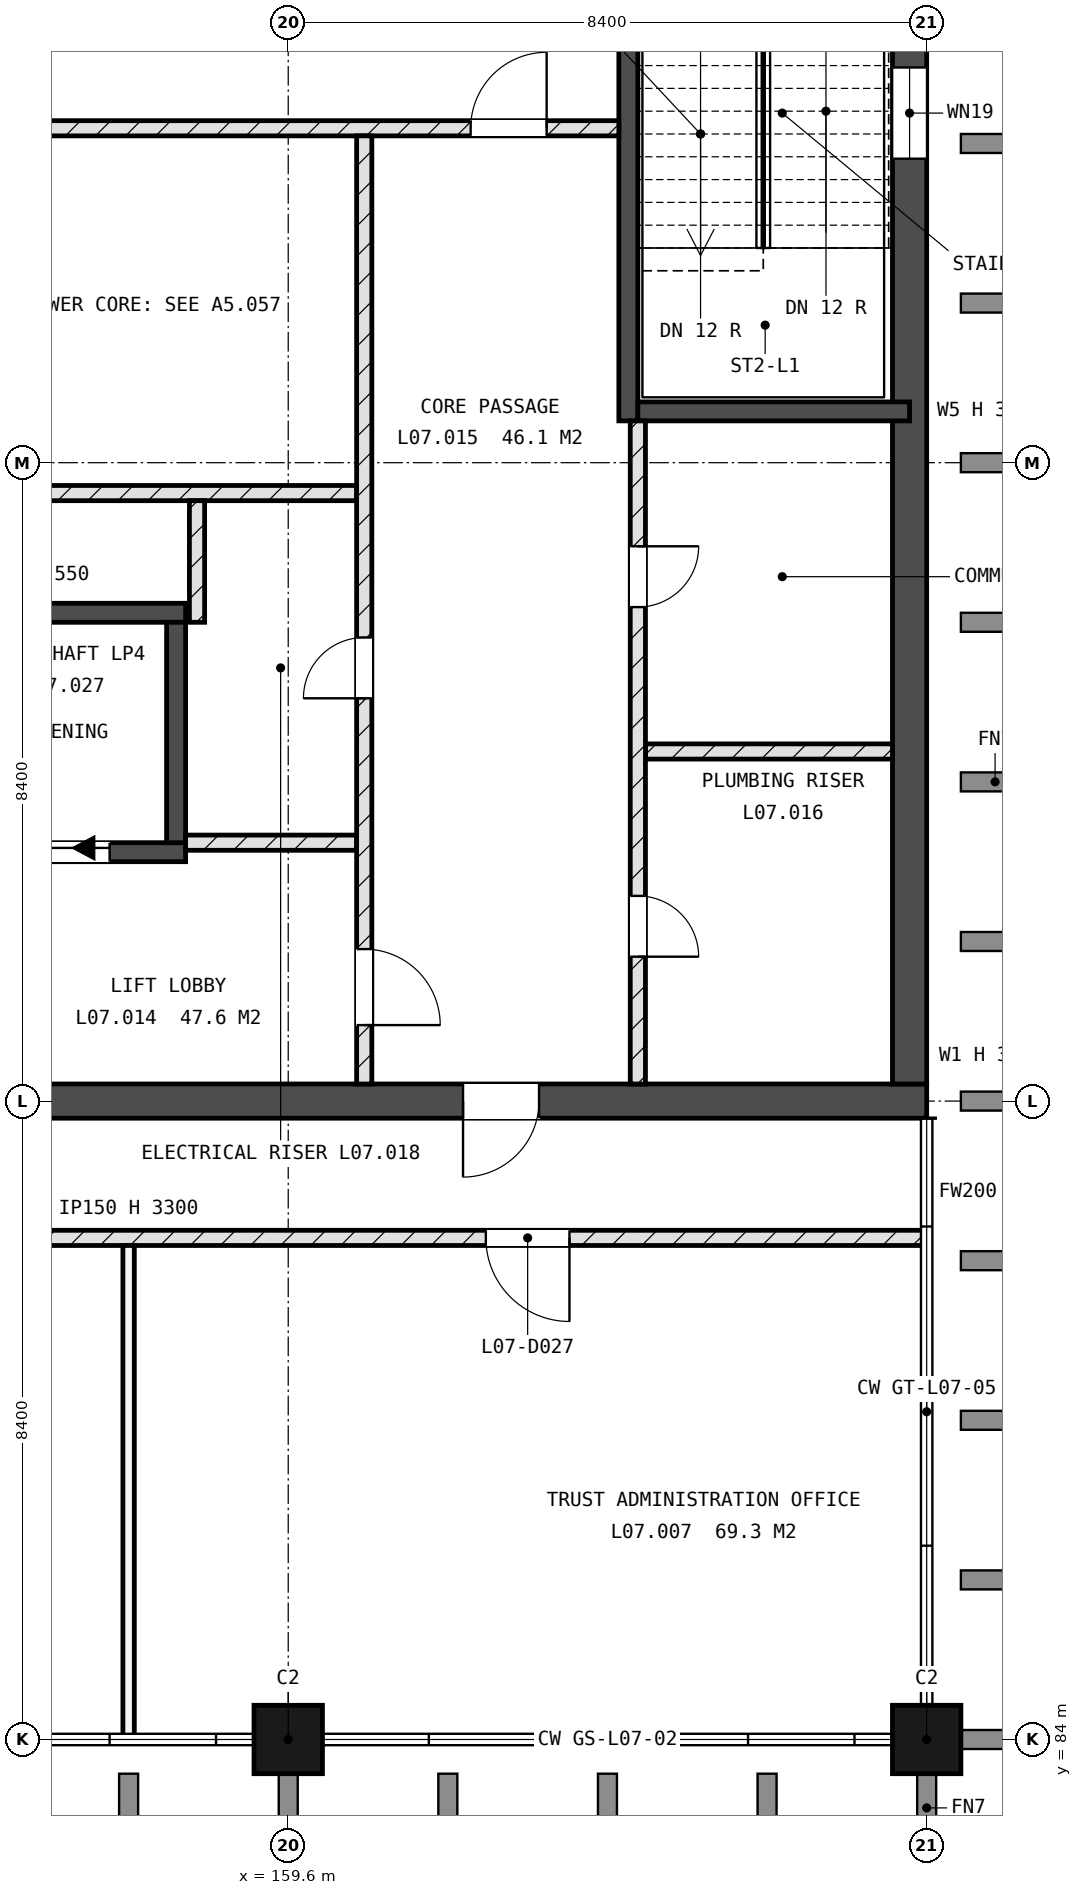
"""IFC4 building model, lengths in metres.
Left out: names, types, materials, properties, quantities, classifications, styles, units other than length and angle.
Written with IfcOpenShell. Run it as: python <this file> out.ifc"""

import sys

from ifc_helpers import new_model, si_unit, direction, frame, frame_2d, origin, origin_2d, place, context, subcontext, project, spatial, rectangle, extrude, element, fill, save


model = new_model("IFC4")
c1 = context("Model", 3, precision=1e-05, world=origin(), true_north=direction((0.0, 1.0)))
c2 = subcontext(c1, "Body", "Model", "MODEL_VIEW")
j1 = project(units=[si_unit("LENGTHUNIT", "METRE"), si_unit("PLANEANGLEUNIT", "RADIAN")], contexts=[c1])
p1 = place(None, origin())
s1 = spatial("IfcSite", under=j1, at=p1, CompositionType="ELEMENT")
p2 = place(p1, origin())
s2 = spatial("IfcBuilding", under=s1, at=p2, CompositionType="ELEMENT")
p3 = place(p2, frame((0.0, 0.0, 28.8)))
s3 = spatial("IfcBuildingStorey", under=s2, at=p3, CompositionType="ELEMENT", Elevation=28.8)
for number, where, z_axis, x_axis in (
    (1, (159.6, 84.0, -0.25), (0.0, 0.0, 1.0), (1.0, 0.0, 0.0)),
    (2, (168.0, 84.0, -0.25), (0.0, 0.0, 1.0), (1.0, 0.0, 0.0)),
):
    element("IfcColumn", number, at=place(p3, frame(where, z_axis=z_axis, x_axis=x_axis)), inside=s3, PredefinedType="COLUMN", context=c2, shape_type="SweptSolid", body=[
        extrude(rectangle(XDim=0.9, YDim=0.9, at=origin_2d()), origin(), (0.0, 0.0, 1.0), 3.6),
    ])
p4 = place(p3, frame((142.8, 92.4, -0.25), z_axis=(0.0, 0.0, 1.0), x_axis=(1.0, 0.0, 0.0)))
e3 = element("IfcWall", 3, at=p4, inside=s3, PredefinedType="SHEAR", context=c2, shape_type="SweptSolid", body=[
    extrude(rectangle(XDim=25.2, YDim=0.45, at=frame_2d((12.6, 0.0))), origin(), (0.0, 0.0, 1.0), 3.6),
])
p5 = place(p4, frame((1.4, 0.0, 0.25)))
e4 = element("IfcOpeningElement", 4, at=p5, cuts=e3, PredefinedType="OPENING", context=c2, shape_type="SweptSolid", body=[
    extrude(rectangle(XDim=1.0, YDim=2.1, at=frame_2d((0.5, 1.05))), frame((0.0, 0.235, 0.0), z_axis=(0.0, -1.0, 0.0), x_axis=(1.0, 0.0, 0.0)), (0.0, 0.0, 1.0), 0.47),
])
p6 = place(p4, frame((19.1, 0.0, 0.25)))
e5 = element("IfcOpeningElement", 5, at=p6, cuts=e3, PredefinedType="OPENING", context=c2, shape_type="SweptSolid", body=[
    extrude(rectangle(XDim=1.0, YDim=2.1, at=frame_2d((0.5, 1.05))), frame((0.0, 0.235, 0.0), z_axis=(0.0, -1.0, 0.0), x_axis=(1.0, 0.0, 0.0)), (0.0, 0.0, 1.0), 0.47),
])
p7 = place(p4, frame((10.4, 0.0, 0.25)))
e6 = element("IfcOpeningElement", 6, at=p7, cuts=e3, PredefinedType="OPENING", context=c2, shape_type="SweptSolid", body=[
    extrude(rectangle(XDim=1.0, YDim=2.1, at=frame_2d((0.5, 1.05))), frame((0.0, 0.235, 0.0), z_axis=(0.0, -1.0, 0.0), x_axis=(1.0, 0.0, 0.0)), (0.0, 0.0, 1.0), 0.47),
])
p8 = place(p3, frame((167.775, 92.625, -0.25), z_axis=(0.0, 0.0, 1.0), x_axis=(0.0, 1.0, 0.0)))
e7 = element("IfcWall", 7, at=p8, inside=s3, PredefinedType="SHEAR", context=c2, shape_type="SweptSolid", body=[
    extrude(rectangle(XDim=16.35, YDim=0.45, at=frame_2d((8.175, 0.0))), origin(), (0.0, 0.0, 1.0), 3.6),
])
p9 = place(p8, frame((12.175, 0.0, 1.85)))
e8 = element("IfcOpeningElement", 8, at=p9, cuts=e7, PredefinedType="OPENING", context=c2, shape_type="SweptSolid", body=[
    extrude(rectangle(XDim=1.2, YDim=0.9, at=frame_2d((0.6, 0.45))), frame((0.0, 0.235, 0.0), z_axis=(0.0, -1.0, 0.0), x_axis=(1.0, 0.0, 0.0)), (0.0, 0.0, 1.0), 0.47),
])
p10 = place(p3, frame((164.075, 101.35, -0.25), z_axis=(0.0, 0.0, 1.0), x_axis=(0.0, 1.0, 0.0)))
e9 = element("IfcWall", 9, at=p10, inside=s3, PredefinedType="SHEAR", context=c2, shape_type="SweptSolid", body=[
    extrude(rectangle(XDim=7.625, YDim=0.25, at=frame_2d((3.812, 0.0))), origin(), (0.0, 0.0, 1.0), 3.6),
])
p11 = place(p10, frame((6.5, 0.0, 0.25)))
e10 = element("IfcOpeningElement", 10, at=p11, cuts=e9, PredefinedType="OPENING", context=c2, shape_type="SweptSolid", body=[
    extrude(rectangle(XDim=1.0, YDim=2.1, at=frame_2d((0.5, 1.05))), frame((0.0, 0.135, 0.0), z_axis=(0.0, -1.0, 0.0), x_axis=(1.0, 0.0, 0.0)), (0.0, 0.0, 1.0), 0.27),
])
p12 = place(p3, frame((164.2, 101.475, -0.25), z_axis=(0.0, 0.0, 1.0), x_axis=(1.0, 0.0, 0.0)))
e11 = element("IfcWall", 11, at=p12, inside=s3, PredefinedType="SHEAR", context=c2, shape_type="SweptSolid", body=[
    extrude(rectangle(XDim=3.575, YDim=0.25, at=frame_2d((1.788, 0.0))), origin(), (0.0, 0.0, 1.0), 3.6),
])
p13 = place(p3, frame((147.0, 95.675, -0.25), z_axis=(0.0, 0.0, 1.0), x_axis=(1.0, 0.0, 0.0)))
e12 = element("IfcWall", 12, at=p13, inside=s3, PredefinedType="SHEAR", context=c2, shape_type="SweptSolid", body=[
    extrude(rectangle(XDim=11.25, YDim=0.25, at=frame_2d((5.625, 0.0))), origin(), (0.0, 0.0, 1.0), 3.6),
])
p14 = place(p13, frame((0.75, 0.0, 0.25)))
e13 = element("IfcOpeningElement", 13, at=p14, cuts=e12, PredefinedType="OPENING", context=c2, shape_type="SweptSolid", body=[
    extrude(rectangle(XDim=1.1, YDim=2.1, at=frame_2d((0.55, 1.05))), frame((0.0, 0.135, 0.0), z_axis=(0.0, -1.0, 0.0), x_axis=(1.0, 0.0, 0.0)), (0.0, 0.0, 1.0), 0.27),
])
p15 = place(p13, frame((3.55, 0.0, 0.25)))
e14 = element("IfcOpeningElement", 14, at=p15, cuts=e12, PredefinedType="OPENING", context=c2, shape_type="SweptSolid", body=[
    extrude(rectangle(XDim=1.1, YDim=2.1, at=frame_2d((0.55, 1.05))), frame((0.0, 0.135, 0.0), z_axis=(0.0, -1.0, 0.0), x_axis=(1.0, 0.0, 0.0)), (0.0, 0.0, 1.0), 0.27),
])
p16 = place(p13, frame((6.35, 0.0, 0.25)))
e15 = element("IfcOpeningElement", 15, at=p16, cuts=e12, PredefinedType="OPENING", context=c2, shape_type="SweptSolid", body=[
    extrude(rectangle(XDim=1.1, YDim=2.1, at=frame_2d((0.55, 1.05))), frame((0.0, 0.135, 0.0), z_axis=(0.0, -1.0, 0.0), x_axis=(1.0, 0.0, 0.0)), (0.0, 0.0, 1.0), 0.27),
])
p17 = place(p13, frame((9.15, 0.0, 0.25)))
e16 = element("IfcOpeningElement", 16, at=p17, cuts=e12, PredefinedType="OPENING", context=c2, shape_type="SweptSolid", body=[
    extrude(rectangle(XDim=1.1, YDim=2.1, at=frame_2d((0.55, 1.05))), frame((0.0, 0.135, 0.0), z_axis=(0.0, -1.0, 0.0), x_axis=(1.0, 0.0, 0.0)), (0.0, 0.0, 1.0), 0.27),
])
p18 = place(p3, frame((147.0, 98.825, -0.25), z_axis=(0.0, 0.0, 1.0), x_axis=(1.0, 0.0, 0.0)))
e17 = element("IfcWall", 17, at=p18, inside=s3, PredefinedType="SHEAR", context=c2, shape_type="SweptSolid", body=[
    extrude(rectangle(XDim=11.25, YDim=0.25, at=frame_2d((5.625, 0.0))), origin(), (0.0, 0.0, 1.0), 3.6),
])
p19 = place(p3, frame((158.125, 95.8, -0.25), z_axis=(0.0, 0.0, 1.0), x_axis=(0.0, 1.0, 0.0)))
e18 = element("IfcWall", 18, at=p19, inside=s3, PredefinedType="SHEAR", context=c2, shape_type="SweptSolid", body=[
    extrude(rectangle(XDim=2.9, YDim=0.25, at=frame_2d((1.45, 0.0))), origin(), (0.0, 0.0, 1.0), 3.6),
])
p20 = place(p3, frame((151.2, 90.6, 0.0), z_axis=(0.0, 0.0, 1.0), x_axis=(1.0, 0.0, 0.0)))
e19 = element("IfcWall", 19, at=p20, inside=s3, PredefinedType="SOLIDWALL", context=c2, shape_type="SweptSolid", body=[
    extrude(rectangle(XDim=16.8, YDim=0.2, at=frame_2d((8.4, 0.0))), origin(), (0.0, 0.0, 1.0), 3.3),
])
p21 = place(p20, frame((2.65, 0.0, 0.0)))
e20 = element("IfcOpeningElement", 20, at=p21, cuts=e19, PredefinedType="OPENING", context=c2, shape_type="SweptSolid", body=[
    extrude(rectangle(XDim=1.0, YDim=2.1, at=frame_2d((0.5, 1.05))), frame((0.0, 0.11, 0.0), z_axis=(0.0, -1.0, 0.0), x_axis=(1.0, 0.0, 0.0)), (0.0, 0.0, 1.0), 0.22),
])
p22 = place(p20, frame((11.0, 0.0, 0.0)))
e21 = element("IfcOpeningElement", 21, at=p22, cuts=e19, PredefinedType="OPENING", context=c2, shape_type="SweptSolid", body=[
    extrude(rectangle(XDim=1.1, YDim=2.25, at=frame_2d((0.55, 1.125))), frame((0.0, 0.11, 0.0), z_axis=(0.0, -1.0, 0.0), x_axis=(1.0, 0.0, 0.0)), (0.0, 0.0, 1.0), 0.22),
])
p23 = place(p3, frame((158.25, 95.8, 0.0), z_axis=(0.0, 0.0, 1.0), x_axis=(1.0, 0.0, 0.0)))
e22 = element("IfcWall", 22, at=p23, inside=s3, PredefinedType="SOLIDWALL", context=c2, shape_type="SweptSolid", body=[
    extrude(rectangle(XDim=2.25, YDim=0.2, at=frame_2d((1.125, 0.0))), origin(), (0.0, 0.0, 1.0), 3.3),
])
p24 = place(p3, frame((164.3, 97.0, 0.0), z_axis=(0.0, 0.0, 1.0), x_axis=(1.0, 0.0, 0.0)))
e23 = element("IfcWall", 23, at=p24, inside=s3, PredefinedType="SOLIDWALL", context=c2, shape_type="SweptSolid", body=[
    extrude(rectangle(XDim=3.25, YDim=0.2, at=frame_2d((1.625, 0.0))), origin(), (0.0, 0.0, 1.0), 3.3),
])
p25 = place(p3, frame((146.5, 100.4, 0.0), z_axis=(0.0, 0.0, 1.0), x_axis=(1.0, 0.0, 0.0)))
e24 = element("IfcWall", 24, at=p25, inside=s3, PredefinedType="SOLIDWALL", context=c2, shape_type="SweptSolid", body=[
    extrude(rectangle(XDim=14.0, YDim=0.2, at=frame_2d((7.0, 0.0))), origin(), (0.0, 0.0, 1.0), 3.3),
])
p26 = place(p3, frame((143.25, 105.2, 0.0), z_axis=(0.0, 0.0, 1.0), x_axis=(1.0, 0.0, 0.0)))
e25 = element("IfcWall", 25, at=p26, inside=s3, PredefinedType="SOLIDWALL", context=c2, shape_type="SweptSolid", body=[
    extrude(rectangle(XDim=20.7, YDim=0.2, at=frame_2d((10.35, 0.0))), origin(), (0.0, 0.0, 1.0), 3.3),
])
p27 = place(p26, frame((11.45, 0.0, 0.0)))
e26 = element("IfcOpeningElement", 26, at=p27, cuts=e25, PredefinedType="OPENING", context=c2, shape_type="SweptSolid", body=[
    extrude(rectangle(XDim=0.8, YDim=2.1, at=frame_2d((0.4, 1.05))), frame((0.0, 0.11, 0.0), z_axis=(0.0, -1.0, 0.0), x_axis=(1.0, 0.0, 0.0)), (0.0, 0.0, 1.0), 0.22),
])
p28 = place(p26, frame((18.75, 0.0, 0.0)))
e27 = element("IfcOpeningElement", 27, at=p28, cuts=e25, PredefinedType="OPENING", context=c2, shape_type="SweptSolid", body=[
    extrude(rectangle(XDim=1.0, YDim=2.1, at=frame_2d((0.5, 1.05))), frame((0.0, 0.11, 0.0), z_axis=(0.0, -1.0, 0.0), x_axis=(1.0, 0.0, 0.0)), (0.0, 0.0, 1.0), 0.22),
])
p29 = place(p3, frame((157.5, 84.0, 0.0), z_axis=(0.0, 0.0, 1.0), x_axis=(0.0, 1.0, 0.0)))
e28 = element("IfcWall", 28, at=p29, inside=s3, PredefinedType="PARTITIONING", context=c2, shape_type="SweptSolid", body=[
    extrude(rectangle(XDim=6.5, YDim=0.15, at=frame_2d((3.25, 0.0))), origin(), (0.0, 0.0, 1.0), 3.3),
])
p30 = place(p3, frame((158.4, 98.7, 0.0), z_axis=(0.0, 0.0, 1.0), x_axis=(0.0, 1.0, 0.0)))
e29 = element("IfcWall", 29, at=p30, inside=s3, PredefinedType="SOLIDWALL", context=c2, shape_type="SweptSolid", body=[
    extrude(rectangle(XDim=1.6, YDim=0.2, at=frame_2d((0.8, 0.0))), origin(), (0.0, 0.0, 1.0), 3.3),
])
p31 = place(p3, frame((160.6, 92.625, 0.0), z_axis=(0.0, 0.0, 1.0), x_axis=(0.0, 1.0, 0.0)))
e30 = element("IfcWall", 30, at=p31, inside=s3, PredefinedType="SOLIDWALL", context=c2, shape_type="SweptSolid", body=[
    extrude(rectangle(XDim=12.475, YDim=0.2, at=frame_2d((6.238, 0.0))), origin(), (0.0, 0.0, 1.0), 3.3),
])
p32 = place(p31, frame((5.075, 0.0, 0.0)))
e31 = element("IfcOpeningElement", 31, at=p32, cuts=e30, PredefinedType="OPENING", context=c2, shape_type="SweptSolid", body=[
    extrude(rectangle(XDim=0.8, YDim=2.1, at=frame_2d((0.4, 1.05))), frame((0.0, 0.11, 0.0), z_axis=(0.0, -1.0, 0.0), x_axis=(1.0, 0.0, 0.0)), (0.0, 0.0, 1.0), 0.22),
])
p33 = place(p31, frame((0.775, 0.0, 0.0)))
e32 = element("IfcOpeningElement", 32, at=p33, cuts=e30, PredefinedType="OPENING", context=c2, shape_type="SweptSolid", body=[
    extrude(rectangle(XDim=1.0, YDim=2.1, at=frame_2d((0.5, 1.05))), frame((0.0, 0.11, 0.0), z_axis=(0.0, -1.0, 0.0), x_axis=(1.0, 0.0, 0.0)), (0.0, 0.0, 1.0), 0.22),
])
p34 = place(p3, frame((164.2, 92.625, 0.0), z_axis=(0.0, 0.0, 1.0), x_axis=(0.0, 1.0, 0.0)))
e33 = element("IfcWall", 33, at=p34, inside=s3, PredefinedType="SOLIDWALL", context=c2, shape_type="SweptSolid", body=[
    extrude(rectangle(XDim=8.725, YDim=0.2, at=frame_2d((4.363, 0.0))), origin(), (0.0, 0.0, 1.0), 3.3),
])
p35 = place(p34, frame((1.675, 0.0, 0.0)))
e34 = element("IfcOpeningElement", 34, at=p35, cuts=e33, PredefinedType="OPENING", context=c2, shape_type="SweptSolid", body=[
    extrude(rectangle(XDim=0.8, YDim=2.1, at=frame_2d((0.4, 1.05))), frame((0.0, 0.11, 0.0), z_axis=(0.0, -1.0, 0.0), x_axis=(1.0, 0.0, 0.0)), (0.0, 0.0, 1.0), 0.22),
])
p36 = place(p34, frame((6.275, 0.0, 0.0)))
e35 = element("IfcOpeningElement", 35, at=p36, cuts=e33, PredefinedType="OPENING", context=c2, shape_type="SweptSolid", body=[
    extrude(rectangle(XDim=0.8, YDim=2.1, at=frame_2d((0.4, 1.05))), frame((0.0, 0.11, 0.0), z_axis=(0.0, -1.0, 0.0), x_axis=(1.0, 0.0, 0.0)), (0.0, 0.0, 1.0), 0.22),
])
p37 = place(p9, origin())
e36 = element("IfcWindow", 36, at=p37, inside=s3, PartitioningType="SINGLE_PANEL", PredefinedType="WINDOW", context=c2, shape_type="SweptSolid", body=[
    extrude(rectangle(XDim=1.2, YDim=0.9, at=frame_2d((0.6, 0.45))), frame((0.0, 0.03, 0.0), z_axis=(0.0, -1.0, 0.0), x_axis=(1.0, 0.0, 0.0)), (0.0, 0.0, 1.0), 0.06),
])
fill(e8, e36)
p38 = place(p17, origin())
e37 = element("IfcDoor", 37, at=p38, inside=s3, OperationType="SLIDING_TO_LEFT", PredefinedType="DOOR", context=c2, shape_type="SweptSolid", body=[
    extrude(rectangle(XDim=1.1, YDim=2.1, at=frame_2d((0.55, 1.05))), frame((0.0, 0.025, 0.0), z_axis=(0.0, -1.0, 0.0), x_axis=(1.0, 0.0, 0.0)), (0.0, 0.0, 1.0), 0.05),
])
fill(e16, e37)
p39 = place(p22, origin())
e38 = element("IfcDoor", 38, at=p39, inside=s3, OperationType="SINGLE_SWING_RIGHT", PredefinedType="DOOR", context=c2, shape_type="SweptSolid", body=[
    extrude(rectangle(XDim=1.1, YDim=2.25, at=frame_2d((0.55, 1.125))), frame((0.0, 0.025, 0.0), z_axis=(0.0, -1.0, 0.0), x_axis=(1.0, 0.0, 0.0)), (0.0, 0.0, 1.0), 0.05),
])
fill(e21, e38)
p40 = place(p35, origin())
e39 = element("IfcDoor", 39, at=p40, inside=s3, OperationType="SINGLE_SWING_LEFT", PredefinedType="DOOR", context=c2, shape_type="SweptSolid", body=[
    extrude(rectangle(XDim=0.8, YDim=2.1, at=frame_2d((0.4, 1.05))), frame((0.0, 0.025, 0.0), z_axis=(0.0, -1.0, 0.0), x_axis=(1.0, 0.0, 0.0)), (0.0, 0.0, 1.0), 0.05),
])
fill(e34, e39)
p41 = place(p36, origin())
e40 = element("IfcDoor", 40, at=p41, inside=s3, OperationType="SINGLE_SWING_RIGHT", PredefinedType="DOOR", context=c2, shape_type="SweptSolid", body=[
    extrude(rectangle(XDim=0.8, YDim=2.1, at=frame_2d((0.4, 1.05))), frame((0.0, 0.025, 0.0), z_axis=(0.0, -1.0, 0.0), x_axis=(1.0, 0.0, 0.0)), (0.0, 0.0, 1.0), 0.05),
])
fill(e35, e40)
p42 = place(p32, origin())
e41 = element("IfcDoor", 41, at=p42, inside=s3, OperationType="SINGLE_SWING_RIGHT", PredefinedType="DOOR", context=c2, shape_type="SweptSolid", body=[
    extrude(rectangle(XDim=0.8, YDim=2.1, at=frame_2d((0.4, 1.05))), frame((0.0, 0.025, 0.0), z_axis=(0.0, -1.0, 0.0), x_axis=(1.0, 0.0, 0.0)), (0.0, 0.0, 1.0), 0.05),
])
fill(e31, e41)
p43 = place(p6, origin())
e42 = element("IfcDoor", 42, at=p43, inside=s3, OperationType="SINGLE_SWING_LEFT", PredefinedType="DOOR", context=c2, shape_type="SweptSolid", body=[
    extrude(rectangle(XDim=1.0, YDim=2.1, at=frame_2d((0.5, 1.05))), frame((0.0, 0.025, 0.0), z_axis=(0.0, -1.0, 0.0), x_axis=(1.0, 0.0, 0.0)), (0.0, 0.0, 1.0), 0.05),
])
fill(e5, e42)
p44 = place(p33, origin())
e43 = element("IfcDoor", 43, at=p44, inside=s3, OperationType="SINGLE_SWING_LEFT", PredefinedType="DOOR", context=c2, shape_type="SweptSolid", body=[
    extrude(rectangle(XDim=1.0, YDim=2.1, at=frame_2d((0.5, 1.05))), frame((0.0, 0.025, 0.0), z_axis=(0.0, -1.0, 0.0), x_axis=(1.0, 0.0, 0.0)), (0.0, 0.0, 1.0), 0.05),
])
fill(e32, e43)
p45 = place(p28, origin())
e44 = element("IfcDoor", 44, at=p45, inside=s3, OperationType="SINGLE_SWING_LEFT", PredefinedType="DOOR", context=c2, shape_type="SweptSolid", body=[
    extrude(rectangle(XDim=1.0, YDim=2.1, at=frame_2d((0.5, 1.05))), frame((0.0, 0.025, 0.0), z_axis=(0.0, -1.0, 0.0), x_axis=(1.0, 0.0, 0.0)), (0.0, 0.0, 1.0), 0.05),
])
fill(e27, e44)
save(model, sys.argv[1])
